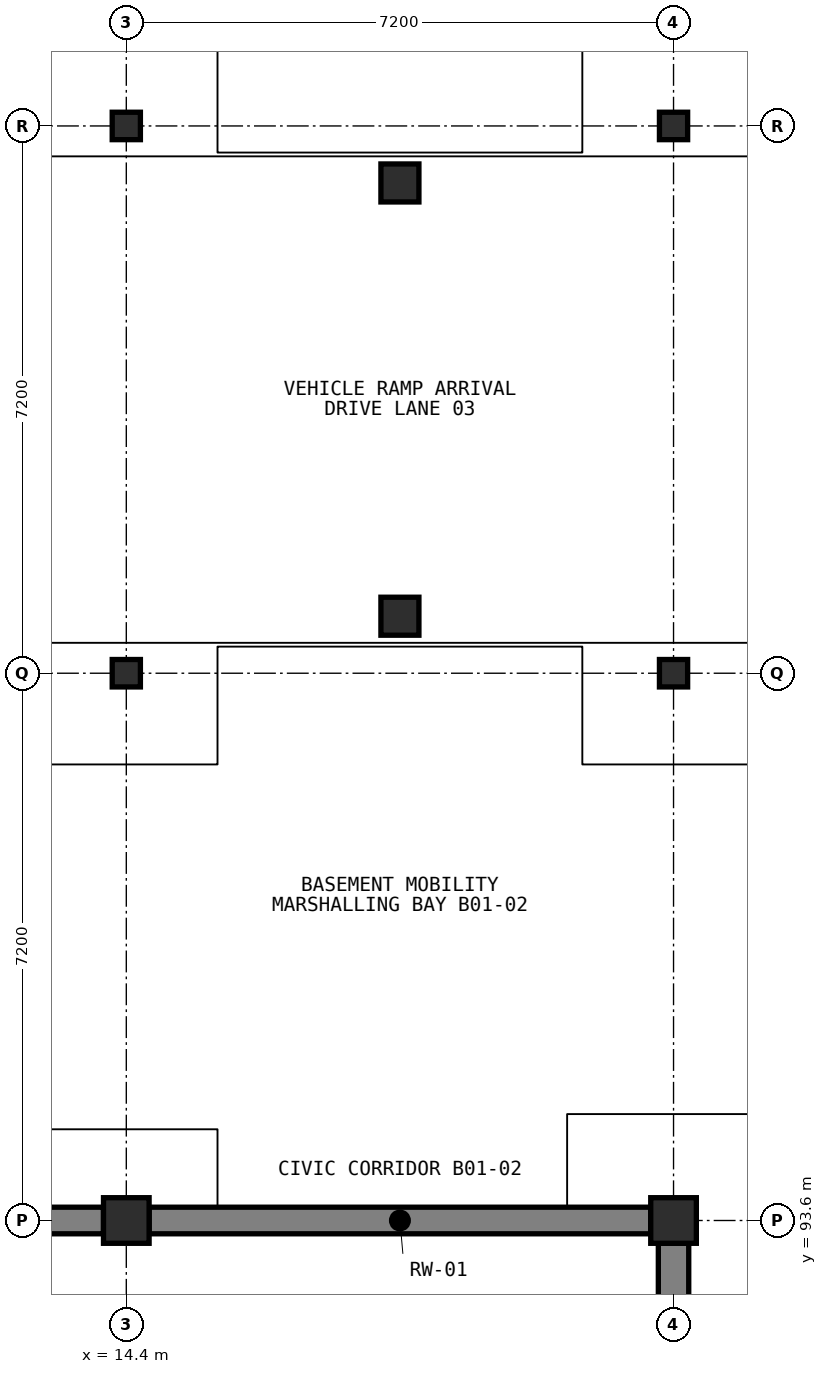
"""IFC4 building model, lengths in metres.
Left out: names, types, materials, properties, quantities, classifications, styles, units other than length and angle.
Written with IfcOpenShell. Run it as: python <this file> out.ifc"""

import sys

from ifc_helpers import new_model, si_unit, direction, frame, frame_2d, origin, origin_2d, place, context, subcontext, project, spatial, rectangle, i_section, extrude, element, save


model = new_model("IFC4")
c1 = context("Model", 3, precision=1e-05, world=origin(), true_north=direction((0.0, 1.0)))
c2 = subcontext(c1, "Body", "Model", "MODEL_VIEW")
j1 = project(units=[si_unit("LENGTHUNIT", "METRE"), si_unit("PLANEANGLEUNIT", "RADIAN")], contexts=[c1])
p1 = place(None, origin())
s1 = spatial("IfcSite", under=j1, at=p1, CompositionType="ELEMENT")
p2 = place(p1, origin())
s2 = spatial("IfcBuilding", under=s1, at=p2, CompositionType="ELEMENT")
p3 = place(p2, frame((0.0, 0.0, -4.2)))
s3 = spatial("IfcBuildingStorey", under=s2, at=p3, CompositionType="ELEMENT", Elevation=-4.2)
for number, where, z_axis, x_axis in (
    (1, (7.5, 93.6, 0.0), (0.0, 0.0, 1.0), (1.0, 0.0, 0.0)),
    (2, (14.7, 93.6, 0.0), (0.0, 0.0, 1.0), (1.0, 0.0, 0.0)),
):
    element("IfcWall", number, at=place(p3, frame(where, z_axis=z_axis, x_axis=x_axis)), inside=s3, PredefinedType="USERDEFINED", context=c2, shape_type="SweptSolid", body=[
        extrude(rectangle(XDim=6.6, YDim=0.35, at=frame_2d((3.3, 0.0))), origin(), (0.0, 0.0, 1.0), 3.98),
    ])
p4 = place(p3, frame((21.6, 86.7, 0.0), z_axis=(0.0, 0.0, 1.0), x_axis=(0.0, 1.0, 0.0)))
e3 = element("IfcWall", 3, at=p4, inside=s3, PredefinedType="USERDEFINED", context=c2, shape_type="SweptSolid", body=[
    extrude(rectangle(XDim=6.6, YDim=0.4, at=frame_2d((3.3, 0.0))), origin(), (0.0, 0.0, 1.0), 3.98),
])
p5 = place(p3, frame((14.4, 93.6, 0.0), z_axis=(0.0, 0.0, 1.0), x_axis=(1.0, 0.0, 0.0)))
e4 = element("IfcColumn", 4, at=p5, inside=s3, PredefinedType="COLUMN", context=c2, shape_type="SweptSolid", body=[
    extrude(rectangle(XDim=0.6, YDim=0.6, at=origin_2d()), origin(), (0.0, 0.0, 1.0), 4.2),
])
for number, where, z_axis, x_axis in (
    (5, (14.4, 100.8, 0.0), (0.0, 0.0, 1.0), (1.0, 0.0, 0.0)),
    (6, (14.4, 108.0, 0.0), (0.0, 0.0, 1.0), (1.0, 0.0, 0.0)),
):
    element("IfcColumn", number, at=place(p3, frame(where, z_axis=z_axis, x_axis=x_axis)), inside=s3, PredefinedType="COLUMN", context=c2, shape_type="SweptSolid", body=[
        extrude(i_section(OverallWidth=0.371, OverallDepth=0.361, WebThickness=0.012, FlangeThickness=0.02, FilletRadius=0.015, at=origin_2d()), origin(), (0.0, 0.0, 1.0), 4.2),
    ])
p6 = place(p3, frame((21.6, 93.6, 0.0), z_axis=(0.0, 0.0, 1.0), x_axis=(1.0, 0.0, 0.0)))
e7 = element("IfcColumn", 7, at=p6, inside=s3, PredefinedType="COLUMN", context=c2, shape_type="SweptSolid", body=[
    extrude(rectangle(XDim=0.6, YDim=0.6, at=origin_2d()), origin(), (0.0, 0.0, 1.0), 4.2),
])
for number, where, z_axis, x_axis in (
    (8, (21.6, 100.8, 0.0), (0.0, 0.0, 1.0), (1.0, 0.0, 0.0)),
    (9, (21.6, 108.0, 0.0), (0.0, 0.0, 1.0), (1.0, 0.0, 0.0)),
):
    element("IfcColumn", number, at=place(p3, frame(where, z_axis=z_axis, x_axis=x_axis)), inside=s3, PredefinedType="COLUMN", context=c2, shape_type="SweptSolid", body=[
        extrude(i_section(OverallWidth=0.371, OverallDepth=0.361, WebThickness=0.012, FlangeThickness=0.02, FilletRadius=0.015, at=origin_2d()), origin(), (0.0, 0.0, 1.0), 4.2),
    ])
for number, where, z_axis, x_axis in (
    (10, (18.0, 101.55, 0.0), (0.0, 0.0, 1.0), (1.0, 0.0, 0.0)),
    (11, (18.0, 107.25, 0.0), (0.0, 0.0, 1.0), (1.0, 0.0, 0.0)),
):
    element("IfcColumn", number, at=place(p3, frame(where, z_axis=z_axis, x_axis=x_axis)), inside=s3, PredefinedType="COLUMN", context=c2, shape_type="SweptSolid", body=[
        extrude(rectangle(XDim=0.5, YDim=0.5, at=origin_2d()), origin(), (0.0, 0.0, 1.0), 1.667),
    ])
save(model, sys.argv[1])
